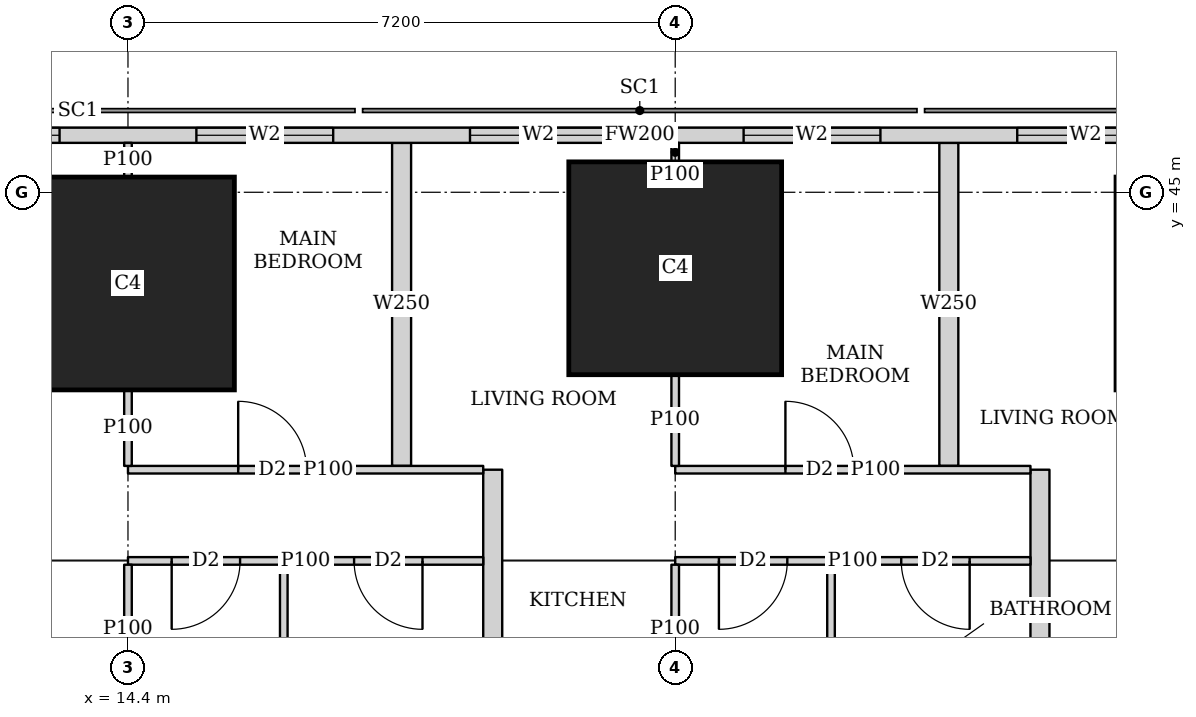
"""IFC4 building model, lengths in metres.
Left out: names, types, materials, properties, quantities, classifications, styles, units other than length and angle.
Written with IfcOpenShell. Run it as: python <this file> out.ifc"""

import sys

from ifc_helpers import new_model, si_unit, direction, frame, frame_2d, origin, origin_2d, place, context, subcontext, project, spatial, rectangle, extrude, element, fill, save


model = new_model("IFC4")
c1 = context("Model", 3, precision=1e-05, world=origin(), true_north=direction((0.0, 1.0)))
c2 = subcontext(c1, "Body", "Model", "MODEL_VIEW")
j1 = project(units=[si_unit("LENGTHUNIT", "METRE"), si_unit("PLANEANGLEUNIT", "RADIAN")], contexts=[c1])
p1 = place(None, origin())
s1 = spatial("IfcSite", under=j1, at=p1, CompositionType="ELEMENT")
p2 = place(p1, origin())
s2 = spatial("IfcBuilding", under=s1, at=p2, CompositionType="ELEMENT")
p3 = place(p2, frame((0.0, 0.0, 65.0)))
s3 = spatial("IfcBuildingStorey", under=s2, at=p3, CompositionType="ELEMENT", Elevation=65.0)
for number, where, z_axis, x_axis in (
    (1, (14.4, 43.8, 0.0), (0.0, 0.0, 1.0), (1.0, 0.0, 0.0)),
    (2, (21.6, 44.0, 0.0), (0.0, 0.0, 1.0), (1.0, 0.0, 0.0)),
):
    element("IfcColumn", number, at=place(p3, frame(where, z_axis=z_axis, x_axis=x_axis)), inside=s3, PredefinedType="COLUMN", context=c2, shape_type="SweptSolid", body=[
        extrude(rectangle(XDim=2.8, YDim=2.8, at=origin_2d()), origin(), (0.0, 0.0, 1.0), 3.75),
    ])
p4 = place(p3, frame((40.106, 45.75, 0.0), z_axis=(0.0, 0.0, 1.0), x_axis=(-1.0, 0.0, 0.0)))
e3 = element("IfcWall", 3, at=p4, inside=s3, PredefinedType="SOLIDWALL", context=c2, shape_type="SweptSolid", body=[
    extrude(rectangle(XDim=37.943, YDim=0.2, at=frame_2d((18.971, 0.0))), origin(), (0.0, 0.0, 1.0), 3.5),
])
p5 = place(p4, frame((8.606, 0.0, 0.9)))
e4 = element("IfcOpeningElement", 4, at=p5, cuts=e3, PredefinedType="OPENING", context=c2, shape_type="SweptSolid", body=[
    extrude(rectangle(XDim=1.8, YDim=1.5, at=frame_2d((0.9, 0.75))), frame((0.0, 0.11, 0.0), z_axis=(0.0, -1.0, 0.0), x_axis=(1.0, 0.0, 0.0)), (0.0, 0.0, 1.0), 0.22),
])
p6 = place(p4, frame((12.206, 0.0, 0.9)))
e5 = element("IfcOpeningElement", 5, at=p6, cuts=e3, PredefinedType="OPENING", context=c2, shape_type="SweptSolid", body=[
    extrude(rectangle(XDim=1.8, YDim=1.5, at=frame_2d((0.9, 0.75))), frame((0.0, 0.11, 0.0), z_axis=(0.0, -1.0, 0.0), x_axis=(1.0, 0.0, 0.0)), (0.0, 0.0, 1.0), 0.22),
])
p7 = place(p4, frame((15.806, 0.0, 0.9)))
e6 = element("IfcOpeningElement", 6, at=p7, cuts=e3, PredefinedType="OPENING", context=c2, shape_type="SweptSolid", body=[
    extrude(rectangle(XDim=1.8, YDim=1.5, at=frame_2d((0.9, 0.75))), frame((0.0, 0.11, 0.0), z_axis=(0.0, -1.0, 0.0), x_axis=(1.0, 0.0, 0.0)), (0.0, 0.0, 1.0), 0.22),
])
p8 = place(p4, frame((19.406, 0.0, 0.9)))
e7 = element("IfcOpeningElement", 7, at=p8, cuts=e3, PredefinedType="OPENING", context=c2, shape_type="SweptSolid", body=[
    extrude(rectangle(XDim=1.8, YDim=1.5, at=frame_2d((0.9, 0.75))), frame((0.0, 0.11, 0.0), z_axis=(0.0, -1.0, 0.0), x_axis=(1.0, 0.0, 0.0)), (0.0, 0.0, 1.0), 0.22),
])
p9 = place(p4, frame((23.006, 0.0, 0.9)))
e8 = element("IfcOpeningElement", 8, at=p9, cuts=e3, PredefinedType="OPENING", context=c2, shape_type="SweptSolid", body=[
    extrude(rectangle(XDim=1.8, YDim=1.5, at=frame_2d((0.9, 0.75))), frame((0.0, 0.11, 0.0), z_axis=(0.0, -1.0, 0.0), x_axis=(1.0, 0.0, 0.0)), (0.0, 0.0, 1.0), 0.22),
])
p10 = place(p4, frame((26.606, 0.0, 0.9)))
e9 = element("IfcOpeningElement", 9, at=p10, cuts=e3, PredefinedType="OPENING", context=c2, shape_type="SweptSolid", body=[
    extrude(rectangle(XDim=1.8, YDim=1.5, at=frame_2d((0.9, 0.75))), frame((0.0, 0.11, 0.0), z_axis=(0.0, -1.0, 0.0), x_axis=(1.0, 0.0, 0.0)), (0.0, 0.0, 1.0), 0.22),
])
p11 = place(p3, frame((14.4, 41.35, 0.0), z_axis=(0.0, 0.0, 1.0), x_axis=(1.0, 0.0, 0.0)))
e10 = element("IfcWall", 10, at=p11, inside=s3, PredefinedType="PARTITIONING", context=c2, shape_type="SweptSolid", body=[
    extrude(rectangle(XDim=4.674, YDim=0.1, at=frame_2d((2.337, 0.0))), origin(), (0.0, 0.0, 1.0), 3.5),
])
p12 = place(p11, frame((1.45, 0.0, 0.0)))
e11 = element("IfcOpeningElement", 11, at=p12, cuts=e10, PredefinedType="OPENING", context=c2, shape_type="SweptSolid", body=[
    extrude(rectangle(XDim=0.9, YDim=2.1, at=frame_2d((0.45, 1.05))), frame((0.0, 0.06, 0.0), z_axis=(0.0, -1.0, 0.0), x_axis=(1.0, 0.0, 0.0)), (0.0, 0.0, 1.0), 0.12),
])
p13 = place(p3, frame((14.4, 40.15, 0.0), z_axis=(0.0, 0.0, 1.0), x_axis=(1.0, 0.0, 0.0)))
e12 = element("IfcWall", 12, at=p13, inside=s3, PredefinedType="PARTITIONING", context=c2, shape_type="SweptSolid", body=[
    extrude(rectangle(XDim=4.674, YDim=0.1, at=frame_2d((2.337, 0.0))), origin(), (0.0, 0.0, 1.0), 3.5),
])
p14 = place(p13, frame((0.575, 0.0, 0.0)))
e13 = element("IfcOpeningElement", 13, at=p14, cuts=e12, PredefinedType="OPENING", context=c2, shape_type="SweptSolid", body=[
    extrude(rectangle(XDim=0.9, YDim=2.1, at=frame_2d((0.45, 1.05))), frame((0.0, 0.06, 0.0), z_axis=(0.0, -1.0, 0.0), x_axis=(1.0, 0.0, 0.0)), (0.0, 0.0, 1.0), 0.12),
])
p15 = place(p13, frame((2.975, 0.0, 0.0)))
e14 = element("IfcOpeningElement", 14, at=p15, cuts=e12, PredefinedType="OPENING", context=c2, shape_type="SweptSolid", body=[
    extrude(rectangle(XDim=0.9, YDim=2.1, at=frame_2d((0.45, 1.05))), frame((0.0, 0.06, 0.0), z_axis=(0.0, -1.0, 0.0), x_axis=(1.0, 0.0, 0.0)), (0.0, 0.0, 1.0), 0.12),
])
p16 = place(p3, frame((14.4, 41.4, 0.0), z_axis=(0.0, 0.0, 1.0), x_axis=(0.0, 1.0, 0.0)))
e15 = element("IfcWall", 15, at=p16, inside=s3, PredefinedType="PARTITIONING", context=c2, shape_type="SweptSolid", body=[
    extrude(rectangle(XDim=0.999, YDim=0.1, at=frame_2d((0.5, 0.0))), origin(), (0.0, 0.0, 1.0), 3.5),
])
p17 = place(p3, frame((14.4, 45.201, 0.0), z_axis=(0.0, 0.0, 1.0), x_axis=(0.0, 1.0, 0.0)))
e16 = element("IfcWall", 16, at=p17, inside=s3, PredefinedType="PARTITIONING", context=c2, shape_type="SweptSolid", body=[
    extrude(rectangle(XDim=0.449, YDim=0.1, at=frame_2d((0.225, 0.0))), origin(), (0.0, 0.0, 1.0), 3.5),
])
p18 = place(p3, frame((14.4, 38.401, 0.0), z_axis=(0.0, 0.0, 1.0), x_axis=(0.0, 1.0, 0.0)))
e17 = element("IfcWall", 17, at=p18, inside=s3, PredefinedType="PARTITIONING", context=c2, shape_type="SweptSolid", body=[
    extrude(rectangle(XDim=1.699, YDim=0.1, at=frame_2d((0.85, 0.0))), origin(), (0.0, 0.0, 1.0), 3.5),
])
p19 = place(p3, frame((16.45, 36.575, 0.0), z_axis=(0.0, 0.0, 1.0), x_axis=(0.0, 1.0, 0.0)))
e18 = element("IfcWall", 18, at=p19, inside=s3, PredefinedType="PARTITIONING", context=c2, shape_type="SweptSolid", body=[
    extrude(rectangle(XDim=3.525, YDim=0.1, at=frame_2d((1.763, 0.0))), origin(), (0.0, 0.0, 1.0), 3.5),
])
p20 = place(p3, frame((21.6, 41.35, 0.0), z_axis=(0.0, 0.0, 1.0), x_axis=(1.0, 0.0, 0.0)))
e19 = element("IfcWall", 19, at=p20, inside=s3, PredefinedType="PARTITIONING", context=c2, shape_type="SweptSolid", body=[
    extrude(rectangle(XDim=4.674, YDim=0.1, at=frame_2d((2.337, 0.0))), origin(), (0.0, 0.0, 1.0), 3.5),
])
p21 = place(p20, frame((1.45, 0.0, 0.0)))
e20 = element("IfcOpeningElement", 20, at=p21, cuts=e19, PredefinedType="OPENING", context=c2, shape_type="SweptSolid", body=[
    extrude(rectangle(XDim=0.9, YDim=2.1, at=frame_2d((0.45, 1.05))), frame((0.0, 0.06, 0.0), z_axis=(0.0, -1.0, 0.0), x_axis=(1.0, 0.0, 0.0)), (0.0, 0.0, 1.0), 0.12),
])
p22 = place(p3, frame((21.6, 40.15, 0.0), z_axis=(0.0, 0.0, 1.0), x_axis=(1.0, 0.0, 0.0)))
e21 = element("IfcWall", 21, at=p22, inside=s3, PredefinedType="PARTITIONING", context=c2, shape_type="SweptSolid", body=[
    extrude(rectangle(XDim=4.674, YDim=0.1, at=frame_2d((2.337, 0.0))), origin(), (0.0, 0.0, 1.0), 3.5),
])
p23 = place(p22, frame((0.575, 0.0, 0.0)))
e22 = element("IfcOpeningElement", 22, at=p23, cuts=e21, PredefinedType="OPENING", context=c2, shape_type="SweptSolid", body=[
    extrude(rectangle(XDim=0.9, YDim=2.1, at=frame_2d((0.45, 1.05))), frame((0.0, 0.06, 0.0), z_axis=(0.0, -1.0, 0.0), x_axis=(1.0, 0.0, 0.0)), (0.0, 0.0, 1.0), 0.12),
])
p24 = place(p22, frame((2.974, 0.0, 0.0)))
e23 = element("IfcOpeningElement", 23, at=p24, cuts=e21, PredefinedType="OPENING", context=c2, shape_type="SweptSolid", body=[
    extrude(rectangle(XDim=0.9, YDim=2.1, at=frame_2d((0.45, 1.05))), frame((0.0, 0.06, 0.0), z_axis=(0.0, -1.0, 0.0), x_axis=(1.0, 0.0, 0.0)), (0.0, 0.0, 1.0), 0.12),
])
p25 = place(p3, frame((21.6, 41.4, 0.0), z_axis=(0.0, 0.0, 1.0), x_axis=(0.0, 1.0, 0.0)))
e24 = element("IfcWall", 24, at=p25, inside=s3, PredefinedType="PARTITIONING", context=c2, shape_type="SweptSolid", body=[
    extrude(rectangle(XDim=1.199, YDim=0.1, at=frame_2d((0.6, 0.0))), origin(), (0.0, 0.0, 1.0), 3.5),
])
p26 = place(p3, frame((21.6, 45.401, 0.0), z_axis=(0.0, 0.0, 1.0), x_axis=(0.0, 1.0, 0.0)))
e25 = element("IfcWall", 25, at=p26, inside=s3, PredefinedType="PARTITIONING", context=c2, shape_type="SweptSolid", body=[
    extrude(rectangle(XDim=0.249, YDim=0.1, at=frame_2d((0.125, 0.0))), origin(), (0.0, 0.0, 1.0), 3.5),
])
p27 = place(p3, frame((21.6, 38.401, 0.0), z_axis=(0.0, 0.0, 1.0), x_axis=(0.0, 1.0, 0.0)))
e26 = element("IfcWall", 26, at=p27, inside=s3, PredefinedType="PARTITIONING", context=c2, shape_type="SweptSolid", body=[
    extrude(rectangle(XDim=1.699, YDim=0.1, at=frame_2d((0.85, 0.0))), origin(), (0.0, 0.0, 1.0), 3.5),
])
p28 = place(p3, frame((23.65, 36.575, 0.0), z_axis=(0.0, 0.0, 1.0), x_axis=(0.0, 1.0, 0.0)))
e27 = element("IfcWall", 27, at=p28, inside=s3, PredefinedType="PARTITIONING", context=c2, shape_type="SweptSolid", body=[
    extrude(rectangle(XDim=3.525, YDim=0.1, at=frame_2d((1.763, 0.0))), origin(), (0.0, 0.0, 1.0), 3.5),
])
p29 = place(p3, frame((18.0, 41.4, 0.0), z_axis=(0.0, 0.0, 1.0), x_axis=(0.0, 1.0, 0.0)))
e28 = element("IfcWall", 28, at=p29, inside=s3, PredefinedType="SOLIDWALL", context=c2, shape_type="SweptSolid", body=[
    extrude(rectangle(XDim=4.25, YDim=0.25, at=frame_2d((2.125, 0.0))), origin(), (0.0, 0.0, 1.0), 2.05),
])
p30 = place(p3, frame((19.199, 36.575, 0.0), z_axis=(0.0, 0.0, 1.0), x_axis=(0.0, 1.0, 0.0)))
e29 = element("IfcWall", 29, at=p30, inside=s3, PredefinedType="SOLIDWALL", context=c2, shape_type="SweptSolid", body=[
    extrude(rectangle(XDim=4.775, YDim=0.25, at=frame_2d((2.388, 0.0))), origin(), (0.0, 0.0, 1.0), 3.5),
])
p31 = place(p3, frame((25.2, 41.4, 0.0), z_axis=(0.0, 0.0, 1.0), x_axis=(0.0, 1.0, 0.0)))
e30 = element("IfcWall", 30, at=p31, inside=s3, PredefinedType="SOLIDWALL", context=c2, shape_type="SweptSolid", body=[
    extrude(rectangle(XDim=4.25, YDim=0.25, at=frame_2d((2.125, 0.0))), origin(), (0.0, 0.0, 1.0), 2.05),
])
p32 = place(p3, frame((26.399, 36.575, 0.0), z_axis=(0.0, 0.0, 1.0), x_axis=(0.0, 1.0, 0.0)))
e31 = element("IfcWall", 31, at=p32, inside=s3, PredefinedType="SOLIDWALL", context=c2, shape_type="SweptSolid", body=[
    extrude(rectangle(XDim=4.775, YDim=0.25, at=frame_2d((2.388, 0.0))), origin(), (0.0, 0.0, 1.0), 3.5),
])
p33 = place(p6, origin())
e32 = element("IfcWindow", 32, at=p33, inside=s3, PartitioningType="SINGLE_PANEL", PredefinedType="WINDOW", context=c2, shape_type="SweptSolid", body=[
    extrude(rectangle(XDim=1.8, YDim=1.5, at=frame_2d((0.9, 0.75))), frame((0.0, 0.03, 0.0), z_axis=(0.0, -1.0, 0.0), x_axis=(1.0, 0.0, 0.0)), (0.0, 0.0, 1.0), 0.06),
])
fill(e5, e32)
p34 = place(p7, origin())
e33 = element("IfcWindow", 33, at=p34, inside=s3, PartitioningType="SINGLE_PANEL", PredefinedType="WINDOW", context=c2, shape_type="SweptSolid", body=[
    extrude(rectangle(XDim=1.8, YDim=1.5, at=frame_2d((0.9, 0.75))), frame((0.0, 0.03, 0.0), z_axis=(0.0, -1.0, 0.0), x_axis=(1.0, 0.0, 0.0)), (0.0, 0.0, 1.0), 0.06),
])
fill(e6, e33)
p35 = place(p8, origin())
e34 = element("IfcWindow", 34, at=p35, inside=s3, PartitioningType="SINGLE_PANEL", PredefinedType="WINDOW", context=c2, shape_type="SweptSolid", body=[
    extrude(rectangle(XDim=1.8, YDim=1.5, at=frame_2d((0.9, 0.75))), frame((0.0, 0.03, 0.0), z_axis=(0.0, -1.0, 0.0), x_axis=(1.0, 0.0, 0.0)), (0.0, 0.0, 1.0), 0.06),
])
fill(e7, e34)
p36 = place(p9, origin())
e35 = element("IfcWindow", 35, at=p36, inside=s3, PartitioningType="SINGLE_PANEL", PredefinedType="WINDOW", context=c2, shape_type="SweptSolid", body=[
    extrude(rectangle(XDim=1.8, YDim=1.5, at=frame_2d((0.9, 0.75))), frame((0.0, 0.03, 0.0), z_axis=(0.0, -1.0, 0.0), x_axis=(1.0, 0.0, 0.0)), (0.0, 0.0, 1.0), 0.06),
])
fill(e8, e35)
p37 = place(p10, origin())
e36 = element("IfcWindow", 36, at=p37, inside=s3, PartitioningType="SINGLE_PANEL", PredefinedType="WINDOW", context=c2, shape_type="SweptSolid", body=[
    extrude(rectangle(XDim=1.8, YDim=1.5, at=frame_2d((0.9, 0.75))), frame((0.0, 0.03, 0.0), z_axis=(0.0, -1.0, 0.0), x_axis=(1.0, 0.0, 0.0)), (0.0, 0.0, 1.0), 0.06),
])
fill(e9, e36)
p38 = place(p12, origin())
e37 = element("IfcDoor", 37, at=p38, inside=s3, OperationType="SINGLE_SWING_LEFT", PredefinedType="DOOR", context=c2, shape_type="SweptSolid", body=[
    extrude(rectangle(XDim=0.9, YDim=2.1, at=frame_2d((0.45, 1.05))), frame((0.0, 0.025, 0.0), z_axis=(0.0, -1.0, 0.0), x_axis=(1.0, 0.0, 0.0)), (0.0, 0.0, 1.0), 0.05),
])
fill(e11, e37)
p39 = place(p14, origin())
e38 = element("IfcDoor", 38, at=p39, inside=s3, OperationType="SINGLE_SWING_RIGHT", PredefinedType="DOOR", context=c2, shape_type="SweptSolid", body=[
    extrude(rectangle(XDim=0.9, YDim=2.1, at=frame_2d((0.45, 1.05))), frame((0.0, 0.025, 0.0), z_axis=(0.0, -1.0, 0.0), x_axis=(1.0, 0.0, 0.0)), (0.0, 0.0, 1.0), 0.05),
])
fill(e13, e38)
p40 = place(p15, origin())
e39 = element("IfcDoor", 39, at=p40, inside=s3, OperationType="SINGLE_SWING_LEFT", PredefinedType="DOOR", context=c2, shape_type="SweptSolid", body=[
    extrude(rectangle(XDim=0.9, YDim=2.1, at=frame_2d((0.45, 1.05))), frame((0.0, 0.025, 0.0), z_axis=(0.0, -1.0, 0.0), x_axis=(1.0, 0.0, 0.0)), (0.0, 0.0, 1.0), 0.05),
])
fill(e14, e39)
p41 = place(p21, origin())
e40 = element("IfcDoor", 40, at=p41, inside=s3, OperationType="SINGLE_SWING_LEFT", PredefinedType="DOOR", context=c2, shape_type="SweptSolid", body=[
    extrude(rectangle(XDim=0.9, YDim=2.1, at=frame_2d((0.45, 1.05))), frame((0.0, 0.025, 0.0), z_axis=(0.0, -1.0, 0.0), x_axis=(1.0, 0.0, 0.0)), (0.0, 0.0, 1.0), 0.05),
])
fill(e20, e40)
p42 = place(p23, origin())
e41 = element("IfcDoor", 41, at=p42, inside=s3, OperationType="SINGLE_SWING_RIGHT", PredefinedType="DOOR", context=c2, shape_type="SweptSolid", body=[
    extrude(rectangle(XDim=0.9, YDim=2.1, at=frame_2d((0.45, 1.05))), frame((0.0, 0.025, 0.0), z_axis=(0.0, -1.0, 0.0), x_axis=(1.0, 0.0, 0.0)), (0.0, 0.0, 1.0), 0.05),
])
fill(e22, e41)
p43 = place(p24, origin())
e42 = element("IfcDoor", 42, at=p43, inside=s3, OperationType="SINGLE_SWING_LEFT", PredefinedType="DOOR", context=c2, shape_type="SweptSolid", body=[
    extrude(rectangle(XDim=0.9, YDim=2.1, at=frame_2d((0.45, 1.05))), frame((0.0, 0.025, 0.0), z_axis=(0.0, -1.0, 0.0), x_axis=(1.0, 0.0, 0.0)), (0.0, 0.0, 1.0), 0.05),
])
fill(e23, e42)
save(model, sys.argv[1])
